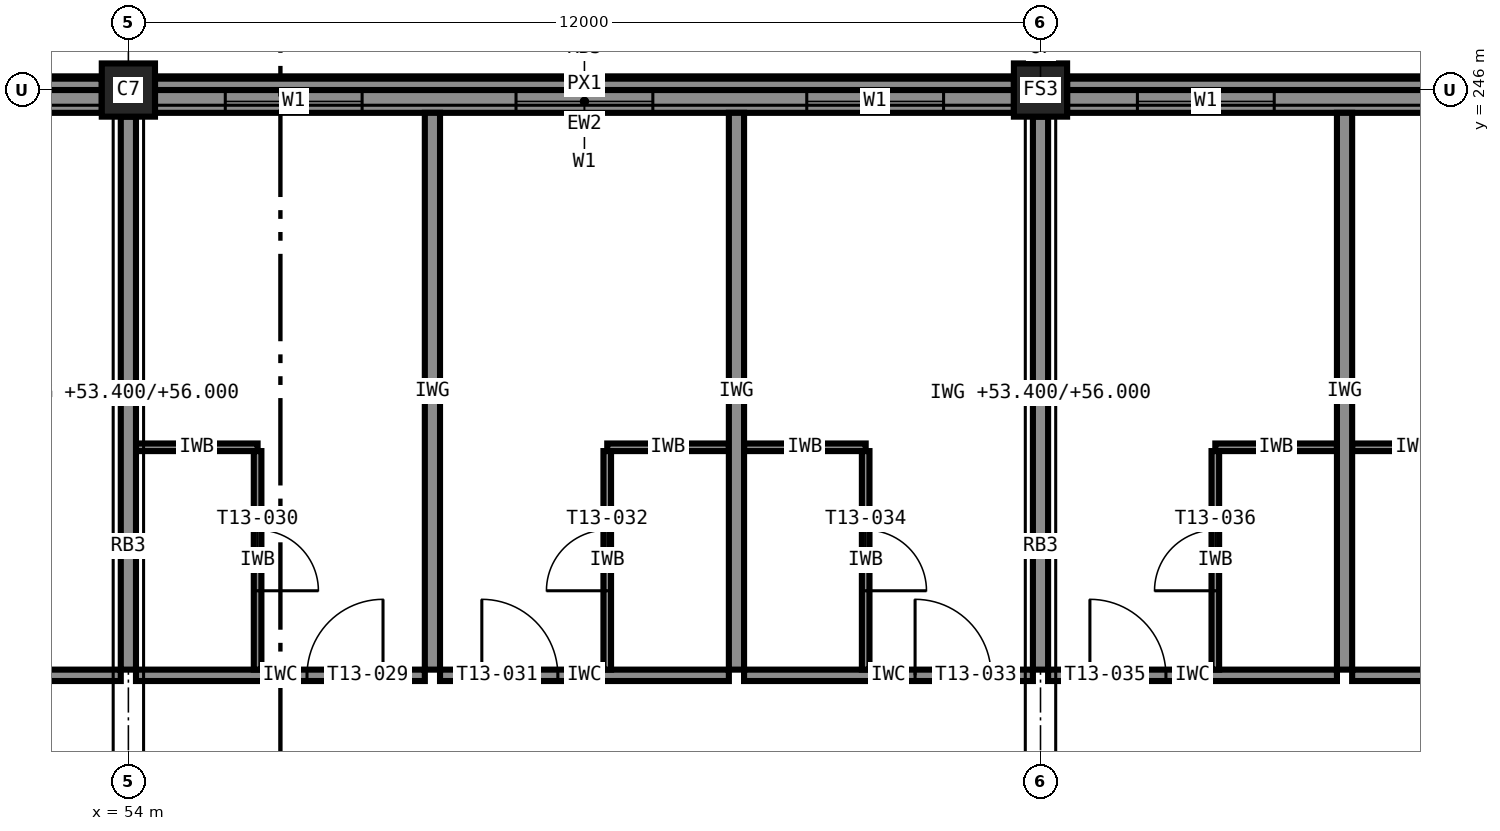
"""IFC4 building model, lengths in metres.
Left out: names, types, materials, properties, quantities, classifications, styles, units other than length and angle.
Written with IfcOpenShell. Run it as: python <this file> out.ifc"""

import sys

from ifc_helpers import new_model, si_unit, direction, frame, frame_2d, origin, origin_2d, place, context, subcontext, project, spatial, rectangle, extrude, element, fill, save


model = new_model("IFC4")
c1 = context("Model", 3, precision=1e-05, world=origin(), true_north=direction((0.0, 1.0)))
c2 = subcontext(c1, "Body", "Model", "MODEL_VIEW")
j1 = project(units=[si_unit("LENGTHUNIT", "METRE"), si_unit("PLANEANGLEUNIT", "RADIAN")], contexts=[c1])
p1 = place(None, origin())
s1 = spatial("IfcSite", under=j1, at=p1, CompositionType="ELEMENT")
p2 = place(p1, origin())
s2 = spatial("IfcBuilding", under=s1, at=p2, CompositionType="ELEMENT")
p3 = place(p2, frame((0.0, 0.0, 53.4)))
s3 = spatial("IfcBuildingStorey", under=s2, at=p3, CompositionType="ELEMENT", Elevation=53.4)
for number, where, z_axis, x_axis in (
    (1, (54.0, 246.0, 0.0), (0.0, 0.0, 1.0), (1.0, 0.0, 0.0)),
    (2, (66.0, 246.0, 0.0), (0.0, 0.0, 1.0), (1.0, 0.0, 0.0)),
):
    element("IfcColumn", number, at=place(p3, frame(where, z_axis=z_axis, x_axis=x_axis)), inside=s3, PredefinedType="COLUMN", context=c2, shape_type="SweptSolid", body=[
        extrude(rectangle(XDim=0.7, YDim=0.7, at=origin_2d()), origin(), (0.0, 0.0, 1.0), 3.6),
    ])
p4 = place(p3, frame((77.65, 245.85, 0.0), z_axis=(0.0, 0.0, 1.0), x_axis=(-1.0, 0.0, 0.0)))
e3 = element("IfcWall", 3, at=p4, inside=s3, PredefinedType="STANDARD", context=c2, shape_type="SweptSolid", body=[
    extrude(rectangle(XDim=11.3, YDim=0.3, at=frame_2d((5.65, 0.0))), origin(), (0.0, 0.0, 1.0), 2.6),
])
p5 = place(p4, frame((8.575, 0.0, 0.85)))
e4 = element("IfcOpeningElement", 4, at=p5, cuts=e3, PredefinedType="OPENING", context=c2, shape_type="SweptSolid", body=[
    extrude(rectangle(XDim=1.8, YDim=1.75, at=frame_2d((0.9, 0.875))), frame((0.0, 0.16, 0.0), z_axis=(0.0, -1.0, 0.0), x_axis=(1.0, 0.0, 0.0)), (0.0, 0.0, 1.0), 0.32),
])
p6 = place(p4, frame((4.75, 0.0, 0.85)))
e5 = element("IfcOpeningElement", 5, at=p6, cuts=e3, PredefinedType="OPENING", context=c2, shape_type="SweptSolid", body=[
    extrude(rectangle(XDim=1.8, YDim=1.75, at=frame_2d((0.9, 0.875))), frame((0.0, 0.16, 0.0), z_axis=(0.0, -1.0, 0.0), x_axis=(1.0, 0.0, 0.0)), (0.0, 0.0, 1.0), 0.32),
])
p7 = place(p4, frame((0.925, 0.0, 0.85)))
e6 = element("IfcOpeningElement", 6, at=p7, cuts=e3, PredefinedType="OPENING", context=c2, shape_type="SweptSolid", body=[
    extrude(rectangle(XDim=1.8, YDim=1.75, at=frame_2d((0.9, 0.875))), frame((0.0, 0.16, 0.0), z_axis=(0.0, -1.0, 0.0), x_axis=(1.0, 0.0, 0.0)), (0.0, 0.0, 1.0), 0.32),
])
p8 = place(p3, frame((65.65, 245.85, 0.0), z_axis=(0.0, 0.0, 1.0), x_axis=(-1.0, 0.0, 0.0)))
e7 = element("IfcWall", 7, at=p8, inside=s3, PredefinedType="STANDARD", context=c2, shape_type="SweptSolid", body=[
    extrude(rectangle(XDim=11.3, YDim=0.3, at=frame_2d((5.65, 0.0))), origin(), (0.0, 0.0, 1.0), 2.6),
])
p9 = place(p8, frame((8.575, 0.0, 0.85)))
e8 = element("IfcOpeningElement", 8, at=p9, cuts=e7, PredefinedType="OPENING", context=c2, shape_type="SweptSolid", body=[
    extrude(rectangle(XDim=1.8, YDim=1.75, at=frame_2d((0.9, 0.875))), frame((0.0, 0.16, 0.0), z_axis=(0.0, -1.0, 0.0), x_axis=(1.0, 0.0, 0.0)), (0.0, 0.0, 1.0), 0.32),
])
p10 = place(p8, frame((4.75, 0.0, 0.85)))
e9 = element("IfcOpeningElement", 9, at=p10, cuts=e7, PredefinedType="OPENING", context=c2, shape_type="SweptSolid", body=[
    extrude(rectangle(XDim=1.8, YDim=1.75, at=frame_2d((0.9, 0.875))), frame((0.0, 0.16, 0.0), z_axis=(0.0, -1.0, 0.0), x_axis=(1.0, 0.0, 0.0)), (0.0, 0.0, 1.0), 0.32),
])
p11 = place(p8, frame((0.925, 0.0, 0.85)))
e10 = element("IfcOpeningElement", 10, at=p11, cuts=e7, PredefinedType="OPENING", context=c2, shape_type="SweptSolid", body=[
    extrude(rectangle(XDim=1.8, YDim=1.75, at=frame_2d((0.9, 0.875))), frame((0.0, 0.16, 0.0), z_axis=(0.0, -1.0, 0.0), x_axis=(1.0, 0.0, 0.0)), (0.0, 0.0, 1.0), 0.32),
])
p12 = place(p3, frame((53.65, 245.85, 0.0), z_axis=(0.0, 0.0, 1.0), x_axis=(-1.0, 0.0, 0.0)))
e11 = element("IfcWall", 11, at=p12, inside=s3, PredefinedType="STANDARD", context=c2, shape_type="SweptSolid", body=[
    extrude(rectangle(XDim=11.3, YDim=0.3, at=frame_2d((5.65, 0.0))), origin(), (0.0, 0.0, 1.0), 2.6),
])
p13 = place(p12, frame((1.012, 0.0, 0.85)))
e12 = element("IfcOpeningElement", 12, at=p13, cuts=e11, PredefinedType="OPENING", context=c2, shape_type="SweptSolid", body=[
    extrude(rectangle(XDim=1.8, YDim=1.75, at=frame_2d((0.9, 0.875))), frame((0.0, 0.16, 0.0), z_axis=(0.0, -1.0, 0.0), x_axis=(1.0, 0.0, 0.0)), (0.0, 0.0, 1.0), 0.32),
])
p14 = place(p12, frame((4.837, 0.0, 0.85)))
e13 = element("IfcOpeningElement", 13, at=p14, cuts=e11, PredefinedType="OPENING", context=c2, shape_type="SweptSolid", body=[
    extrude(rectangle(XDim=1.8, YDim=1.75, at=frame_2d((0.9, 0.875))), frame((0.0, 0.16, 0.0), z_axis=(0.0, -1.0, 0.0), x_axis=(1.0, 0.0, 0.0)), (0.0, 0.0, 1.0), 0.32),
])
for number, where, z_axis, x_axis in (
    (14, (77.65, 246.075, 3.4), (0.0, 0.0, 1.0), (-1.0, 0.0, 0.0)),
    (15, (65.65, 246.075, 3.4), (0.0, 0.0, 1.0), (-1.0, 0.0, 0.0)),
    (16, (53.65, 246.075, 3.4), (0.0, 0.0, 1.0), (-1.0, 0.0, 0.0)),
):
    element("IfcWall", number, at=place(p3, frame(where, z_axis=z_axis, x_axis=x_axis)), inside=s3, PredefinedType="STANDARD", context=c2, shape_type="SweptSolid", body=[
        extrude(rectangle(XDim=11.3, YDim=0.15, at=frame_2d((5.65, 0.0))), origin(), (0.0, 0.0, 1.0), 0.2),
    ])
p15 = place(p3, frame((46.0, 238.3, 0.0), z_axis=(0.0, 0.0, 1.0), x_axis=(1.0, 0.0, 0.0)))
e17 = element("IfcWall", 17, at=p15, inside=s3, PredefinedType="PARTITIONING", context=c2, shape_type="SweptSolid", body=[
    extrude(rectangle(XDim=7.9, YDim=0.15, at=frame_2d((3.95, 0.0))), origin(), (0.0, 0.0, 1.0), 3.4),
])
p16 = place(p15, frame((0.7, 0.0, 0.0)))
e18 = element("IfcOpeningElement", 18, at=p16, cuts=e17, PredefinedType="OPENING", context=c2, shape_type="SweptSolid", body=[
    extrude(rectangle(XDim=1.0, YDim=2.1, at=frame_2d((0.5, 1.05))), frame((0.0, 0.085, 0.0), z_axis=(0.0, -1.0, 0.0), x_axis=(1.0, 0.0, 0.0)), (0.0, 0.0, 1.0), 0.17),
])
p17 = place(p3, frame((54.1, 238.3, 0.0), z_axis=(0.0, 0.0, 1.0), x_axis=(1.0, 0.0, 0.0)))
e19 = element("IfcWall", 19, at=p17, inside=s3, PredefinedType="PARTITIONING", context=c2, shape_type="SweptSolid", body=[
    extrude(rectangle(XDim=3.8, YDim=0.15, at=frame_2d((1.9, 0.0))), origin(), (0.0, 0.0, 1.0), 3.4),
])
p18 = place(p17, frame((2.25, 0.0, 0.0)))
e20 = element("IfcOpeningElement", 20, at=p18, cuts=e19, PredefinedType="OPENING", context=c2, shape_type="SweptSolid", body=[
    extrude(rectangle(XDim=1.0, YDim=2.1, at=frame_2d((0.5, 1.05))), frame((0.0, 0.085, 0.0), z_axis=(0.0, -1.0, 0.0), x_axis=(1.0, 0.0, 0.0)), (0.0, 0.0, 1.0), 0.17),
])
p19 = place(p3, frame((54.1, 241.3, 0.0), z_axis=(0.0, 0.0, 1.0), x_axis=(1.0, 0.0, 0.0)))
e21 = element("IfcWall", 21, at=p19, inside=s3, PredefinedType="PARTITIONING", context=c2, shape_type="SweptSolid", body=[
    extrude(rectangle(XDim=1.6, YDim=0.1, at=frame_2d((0.8, 0.0))), origin(), (0.0, 0.0, 1.0), 3.4),
])
p20 = place(p3, frame((55.7, 241.25, 0.0), z_axis=(0.0, 0.0, 1.0), x_axis=(0.0, -1.0, 0.0)))
e22 = element("IfcWall", 22, at=p20, inside=s3, PredefinedType="PARTITIONING", context=c2, shape_type="SweptSolid", body=[
    extrude(rectangle(XDim=2.875, YDim=0.1, at=frame_2d((1.438, 0.0))), origin(), (0.0, 0.0, 1.0), 3.4),
])
p21 = place(p20, frame((1.038, 0.0, 0.0)))
e23 = element("IfcOpeningElement", 23, at=p21, cuts=e22, PredefinedType="OPENING", context=c2, shape_type="SweptSolid", body=[
    extrude(rectangle(XDim=0.8, YDim=2.1, at=frame_2d((0.4, 1.05))), frame((0.0, 0.06, 0.0), z_axis=(0.0, -1.0, 0.0), x_axis=(1.0, 0.0, 0.0)), (0.0, 0.0, 1.0), 0.12),
])
p22 = place(p3, frame((58.1, 238.3, 0.0), z_axis=(0.0, 0.0, 1.0), x_axis=(1.0, 0.0, 0.0)))
e24 = element("IfcWall", 24, at=p22, inside=s3, PredefinedType="PARTITIONING", context=c2, shape_type="SweptSolid", body=[
    extrude(rectangle(XDim=3.8, YDim=0.15, at=frame_2d((1.9, 0.0))), origin(), (0.0, 0.0, 1.0), 3.4),
])
p23 = place(p22, frame((0.55, 0.0, 0.0)))
e25 = element("IfcOpeningElement", 25, at=p23, cuts=e24, PredefinedType="OPENING", context=c2, shape_type="SweptSolid", body=[
    extrude(rectangle(XDim=1.0, YDim=2.1, at=frame_2d((0.5, 1.05))), frame((0.0, 0.085, 0.0), z_axis=(0.0, -1.0, 0.0), x_axis=(1.0, 0.0, 0.0)), (0.0, 0.0, 1.0), 0.17),
])
p24 = place(p3, frame((60.3, 241.3, 0.0), z_axis=(0.0, 0.0, 1.0), x_axis=(1.0, 0.0, 0.0)))
e26 = element("IfcWall", 26, at=p24, inside=s3, PredefinedType="PARTITIONING", context=c2, shape_type="SweptSolid", body=[
    extrude(rectangle(XDim=1.6, YDim=0.1, at=frame_2d((0.8, 0.0))), origin(), (0.0, 0.0, 1.0), 3.4),
])
p25 = place(p3, frame((60.3, 238.375, 0.0), z_axis=(0.0, 0.0, 1.0), x_axis=(0.0, 1.0, 0.0)))
e27 = element("IfcWall", 27, at=p25, inside=s3, PredefinedType="PARTITIONING", context=c2, shape_type="SweptSolid", body=[
    extrude(rectangle(XDim=2.875, YDim=0.1, at=frame_2d((1.438, 0.0))), origin(), (0.0, 0.0, 1.0), 3.4),
])
p26 = place(p25, frame((1.038, 0.0, 0.0)))
e28 = element("IfcOpeningElement", 28, at=p26, cuts=e27, PredefinedType="OPENING", context=c2, shape_type="SweptSolid", body=[
    extrude(rectangle(XDim=0.8, YDim=2.1, at=frame_2d((0.4, 1.05))), frame((0.0, 0.06, 0.0), z_axis=(0.0, -1.0, 0.0), x_axis=(1.0, 0.0, 0.0)), (0.0, 0.0, 1.0), 0.12),
])
p27 = place(p3, frame((62.1, 238.3, 0.0), z_axis=(0.0, 0.0, 1.0), x_axis=(1.0, 0.0, 0.0)))
e29 = element("IfcWall", 29, at=p27, inside=s3, PredefinedType="PARTITIONING", context=c2, shape_type="SweptSolid", body=[
    extrude(rectangle(XDim=3.8, YDim=0.15, at=frame_2d((1.9, 0.0))), origin(), (0.0, 0.0, 1.0), 3.4),
])
p28 = place(p27, frame((2.25, 0.0, 0.0)))
e30 = element("IfcOpeningElement", 30, at=p28, cuts=e29, PredefinedType="OPENING", context=c2, shape_type="SweptSolid", body=[
    extrude(rectangle(XDim=1.0, YDim=2.1, at=frame_2d((0.5, 1.05))), frame((0.0, 0.085, 0.0), z_axis=(0.0, -1.0, 0.0), x_axis=(1.0, 0.0, 0.0)), (0.0, 0.0, 1.0), 0.17),
])
p29 = place(p3, frame((62.1, 241.3, 0.0), z_axis=(0.0, 0.0, 1.0), x_axis=(1.0, 0.0, 0.0)))
e31 = element("IfcWall", 31, at=p29, inside=s3, PredefinedType="PARTITIONING", context=c2, shape_type="SweptSolid", body=[
    extrude(rectangle(XDim=1.6, YDim=0.1, at=frame_2d((0.8, 0.0))), origin(), (0.0, 0.0, 1.0), 3.4),
])
p30 = place(p3, frame((63.7, 241.25, 0.0), z_axis=(0.0, 0.0, 1.0), x_axis=(0.0, -1.0, 0.0)))
e32 = element("IfcWall", 32, at=p30, inside=s3, PredefinedType="PARTITIONING", context=c2, shape_type="SweptSolid", body=[
    extrude(rectangle(XDim=2.875, YDim=0.1, at=frame_2d((1.438, 0.0))), origin(), (0.0, 0.0, 1.0), 3.4),
])
p31 = place(p30, frame((1.038, 0.0, 0.0)))
e33 = element("IfcOpeningElement", 33, at=p31, cuts=e32, PredefinedType="OPENING", context=c2, shape_type="SweptSolid", body=[
    extrude(rectangle(XDim=0.8, YDim=2.1, at=frame_2d((0.4, 1.05))), frame((0.0, 0.06, 0.0), z_axis=(0.0, -1.0, 0.0), x_axis=(1.0, 0.0, 0.0)), (0.0, 0.0, 1.0), 0.12),
])
p32 = place(p3, frame((66.1, 238.3, 0.0), z_axis=(0.0, 0.0, 1.0), x_axis=(1.0, 0.0, 0.0)))
e34 = element("IfcWall", 34, at=p32, inside=s3, PredefinedType="PARTITIONING", context=c2, shape_type="SweptSolid", body=[
    extrude(rectangle(XDim=3.8, YDim=0.15, at=frame_2d((1.9, 0.0))), origin(), (0.0, 0.0, 1.0), 3.4),
])
p33 = place(p32, frame((0.55, 0.0, 0.0)))
e35 = element("IfcOpeningElement", 35, at=p33, cuts=e34, PredefinedType="OPENING", context=c2, shape_type="SweptSolid", body=[
    extrude(rectangle(XDim=1.0, YDim=2.1, at=frame_2d((0.5, 1.05))), frame((0.0, 0.085, 0.0), z_axis=(0.0, -1.0, 0.0), x_axis=(1.0, 0.0, 0.0)), (0.0, 0.0, 1.0), 0.17),
])
p34 = place(p3, frame((68.3, 241.3, 0.0), z_axis=(0.0, 0.0, 1.0), x_axis=(1.0, 0.0, 0.0)))
e36 = element("IfcWall", 36, at=p34, inside=s3, PredefinedType="PARTITIONING", context=c2, shape_type="SweptSolid", body=[
    extrude(rectangle(XDim=1.6, YDim=0.1, at=frame_2d((0.8, 0.0))), origin(), (0.0, 0.0, 1.0), 3.4),
])
p35 = place(p3, frame((68.3, 238.375, 0.0), z_axis=(0.0, 0.0, 1.0), x_axis=(0.0, 1.0, 0.0)))
e37 = element("IfcWall", 37, at=p35, inside=s3, PredefinedType="PARTITIONING", context=c2, shape_type="SweptSolid", body=[
    extrude(rectangle(XDim=2.875, YDim=0.1, at=frame_2d((1.438, 0.0))), origin(), (0.0, 0.0, 1.0), 3.4),
])
p36 = place(p35, frame((1.038, 0.0, 0.0)))
e38 = element("IfcOpeningElement", 38, at=p36, cuts=e37, PredefinedType="OPENING", context=c2, shape_type="SweptSolid", body=[
    extrude(rectangle(XDim=0.8, YDim=2.1, at=frame_2d((0.4, 1.05))), frame((0.0, 0.06, 0.0), z_axis=(0.0, -1.0, 0.0), x_axis=(1.0, 0.0, 0.0)), (0.0, 0.0, 1.0), 0.12),
])
p37 = place(p3, frame((70.1, 238.3, 0.0), z_axis=(0.0, 0.0, 1.0), x_axis=(1.0, 0.0, 0.0)))
e39 = element("IfcWall", 39, at=p37, inside=s3, PredefinedType="PARTITIONING", context=c2, shape_type="SweptSolid", body=[
    extrude(rectangle(XDim=3.8, YDim=0.15, at=frame_2d((1.9, 0.0))), origin(), (0.0, 0.0, 1.0), 3.4),
])
p38 = place(p37, frame((2.25, 0.0, 0.0)))
e40 = element("IfcOpeningElement", 40, at=p38, cuts=e39, PredefinedType="OPENING", context=c2, shape_type="SweptSolid", body=[
    extrude(rectangle(XDim=1.0, YDim=2.1, at=frame_2d((0.5, 1.05))), frame((0.0, 0.085, 0.0), z_axis=(0.0, -1.0, 0.0), x_axis=(1.0, 0.0, 0.0)), (0.0, 0.0, 1.0), 0.17),
])
p39 = place(p3, frame((70.1, 241.3, 0.0), z_axis=(0.0, 0.0, 1.0), x_axis=(1.0, 0.0, 0.0)))
e41 = element("IfcWall", 41, at=p39, inside=s3, PredefinedType="PARTITIONING", context=c2, shape_type="SweptSolid", body=[
    extrude(rectangle(XDim=1.6, YDim=0.1, at=frame_2d((0.8, 0.0))), origin(), (0.0, 0.0, 1.0), 3.4),
])
p40 = place(p3, frame((54.0, 245.65, 0.0), z_axis=(0.0, 0.0, 1.0), x_axis=(0.0, -1.0, 0.0)))
e42 = element("IfcWall", 42, at=p40, inside=s3, PredefinedType="PARTITIONING", context=c2, shape_type="SweptSolid", body=[
    extrude(rectangle(XDim=7.275, YDim=0.2, at=frame_2d((3.637, 0.0))), origin(), (0.0, 0.0, 1.0), 2.6),
])
for number, where, z_axis, x_axis in (
    (43, (58.0, 245.7, 0.0), (0.0, 0.0, 1.0), (0.0, -1.0, 0.0)),
    (44, (62.0, 245.7, 0.0), (0.0, 0.0, 1.0), (0.0, -1.0, 0.0)),
):
    element("IfcWall", number, at=place(p3, frame(where, z_axis=z_axis, x_axis=x_axis)), inside=s3, PredefinedType="PARTITIONING", context=c2, shape_type="SweptSolid", body=[
        extrude(rectangle(XDim=7.325, YDim=0.2, at=frame_2d((3.663, 0.0))), origin(), (0.0, 0.0, 1.0), 3.4),
    ])
p41 = place(p3, frame((66.0, 245.65, 0.0), z_axis=(0.0, 0.0, 1.0), x_axis=(0.0, -1.0, 0.0)))
e45 = element("IfcWall", 45, at=p41, inside=s3, PredefinedType="PARTITIONING", context=c2, shape_type="SweptSolid", body=[
    extrude(rectangle(XDim=7.275, YDim=0.2, at=frame_2d((3.637, 0.0))), origin(), (0.0, 0.0, 1.0), 2.6),
])
p42 = place(p3, frame((70.0, 245.7, 0.0), z_axis=(0.0, 0.0, 1.0), x_axis=(0.0, -1.0, 0.0)))
e46 = element("IfcWall", 46, at=p42, inside=s3, PredefinedType="PARTITIONING", context=c2, shape_type="SweptSolid", body=[
    extrude(rectangle(XDim=7.325, YDim=0.2, at=frame_2d((3.663, 0.0))), origin(), (0.0, 0.0, 1.0), 3.4),
])
p43 = place(p5, origin())
e47 = element("IfcWindow", 47, at=p43, inside=s3, PartitioningType="SINGLE_PANEL", PredefinedType="WINDOW", context=c2, shape_type="SweptSolid", body=[
    extrude(rectangle(XDim=1.8, YDim=1.75, at=frame_2d((0.9, 0.875))), frame((0.0, 0.03, 0.0), z_axis=(0.0, -1.0, 0.0), x_axis=(1.0, 0.0, 0.0)), (0.0, 0.0, 1.0), 0.06),
])
fill(e4, e47)
p44 = place(p9, origin())
e48 = element("IfcWindow", 48, at=p44, inside=s3, PartitioningType="SINGLE_PANEL", PredefinedType="WINDOW", context=c2, shape_type="SweptSolid", body=[
    extrude(rectangle(XDim=1.8, YDim=1.75, at=frame_2d((0.9, 0.875))), frame((0.0, 0.03, 0.0), z_axis=(0.0, -1.0, 0.0), x_axis=(1.0, 0.0, 0.0)), (0.0, 0.0, 1.0), 0.06),
])
fill(e8, e48)
p45 = place(p10, origin())
e49 = element("IfcWindow", 49, at=p45, inside=s3, PartitioningType="SINGLE_PANEL", PredefinedType="WINDOW", context=c2, shape_type="SweptSolid", body=[
    extrude(rectangle(XDim=1.8, YDim=1.75, at=frame_2d((0.9, 0.875))), frame((0.0, 0.03, 0.0), z_axis=(0.0, -1.0, 0.0), x_axis=(1.0, 0.0, 0.0)), (0.0, 0.0, 1.0), 0.06),
])
fill(e9, e49)
p46 = place(p11, origin())
e50 = element("IfcWindow", 50, at=p46, inside=s3, PartitioningType="SINGLE_PANEL", PredefinedType="WINDOW", context=c2, shape_type="SweptSolid", body=[
    extrude(rectangle(XDim=1.8, YDim=1.75, at=frame_2d((0.9, 0.875))), frame((0.0, 0.03, 0.0), z_axis=(0.0, -1.0, 0.0), x_axis=(1.0, 0.0, 0.0)), (0.0, 0.0, 1.0), 0.06),
])
fill(e10, e50)
p47 = place(p18, origin())
e51 = element("IfcDoor", 51, at=p47, inside=s3, OperationType="SINGLE_SWING_RIGHT", PredefinedType="DOOR", context=c2, shape_type="SweptSolid", body=[
    extrude(rectangle(XDim=1.0, YDim=2.1, at=frame_2d((0.5, 1.05))), frame((0.0, 0.025, 0.0), z_axis=(0.0, -1.0, 0.0), x_axis=(1.0, 0.0, 0.0)), (0.0, 0.0, 1.0), 0.05),
])
fill(e20, e51)
p48 = place(p21, origin())
e52 = element("IfcDoor", 52, at=p48, inside=s3, OperationType="SINGLE_SWING_RIGHT", PredefinedType="DOOR", context=c2, shape_type="SweptSolid", body=[
    extrude(rectangle(XDim=0.8, YDim=2.1, at=frame_2d((0.4, 1.05))), frame((0.0, 0.025, 0.0), z_axis=(0.0, -1.0, 0.0), x_axis=(1.0, 0.0, 0.0)), (0.0, 0.0, 1.0), 0.05),
])
fill(e23, e52)
p49 = place(p23, origin())
e53 = element("IfcDoor", 53, at=p49, inside=s3, OperationType="SINGLE_SWING_LEFT", PredefinedType="DOOR", context=c2, shape_type="SweptSolid", body=[
    extrude(rectangle(XDim=1.0, YDim=2.1, at=frame_2d((0.5, 1.05))), frame((0.0, 0.025, 0.0), z_axis=(0.0, -1.0, 0.0), x_axis=(1.0, 0.0, 0.0)), (0.0, 0.0, 1.0), 0.05),
])
fill(e25, e53)
p50 = place(p26, origin())
e54 = element("IfcDoor", 54, at=p50, inside=s3, OperationType="SINGLE_SWING_LEFT", PredefinedType="DOOR", context=c2, shape_type="SweptSolid", body=[
    extrude(rectangle(XDim=0.8, YDim=2.1, at=frame_2d((0.4, 1.05))), frame((0.0, 0.025, 0.0), z_axis=(0.0, -1.0, 0.0), x_axis=(1.0, 0.0, 0.0)), (0.0, 0.0, 1.0), 0.05),
])
fill(e28, e54)
p51 = place(p28, origin())
e55 = element("IfcDoor", 55, at=p51, inside=s3, OperationType="SINGLE_SWING_LEFT", PredefinedType="DOOR", context=c2, shape_type="SweptSolid", body=[
    extrude(rectangle(XDim=1.0, YDim=2.1, at=frame_2d((0.5, 1.05))), frame((0.0, 0.025, 0.0), z_axis=(0.0, -1.0, 0.0), x_axis=(1.0, 0.0, 0.0)), (0.0, 0.0, 1.0), 0.05),
])
fill(e30, e55)
p52 = place(p31, origin())
e56 = element("IfcDoor", 56, at=p52, inside=s3, OperationType="SINGLE_SWING_RIGHT", PredefinedType="DOOR", context=c2, shape_type="SweptSolid", body=[
    extrude(rectangle(XDim=0.8, YDim=2.1, at=frame_2d((0.4, 1.05))), frame((0.0, 0.025, 0.0), z_axis=(0.0, -1.0, 0.0), x_axis=(1.0, 0.0, 0.0)), (0.0, 0.0, 1.0), 0.05),
])
fill(e33, e56)
p53 = place(p33, origin())
e57 = element("IfcDoor", 57, at=p53, inside=s3, OperationType="SINGLE_SWING_LEFT", PredefinedType="DOOR", context=c2, shape_type="SweptSolid", body=[
    extrude(rectangle(XDim=1.0, YDim=2.1, at=frame_2d((0.5, 1.05))), frame((0.0, 0.025, 0.0), z_axis=(0.0, -1.0, 0.0), x_axis=(1.0, 0.0, 0.0)), (0.0, 0.0, 1.0), 0.05),
])
fill(e35, e57)
p54 = place(p36, origin())
e58 = element("IfcDoor", 58, at=p54, inside=s3, OperationType="SINGLE_SWING_LEFT", PredefinedType="DOOR", context=c2, shape_type="SweptSolid", body=[
    extrude(rectangle(XDim=0.8, YDim=2.1, at=frame_2d((0.4, 1.05))), frame((0.0, 0.025, 0.0), z_axis=(0.0, -1.0, 0.0), x_axis=(1.0, 0.0, 0.0)), (0.0, 0.0, 1.0), 0.05),
])
fill(e38, e58)
save(model, sys.argv[1])
